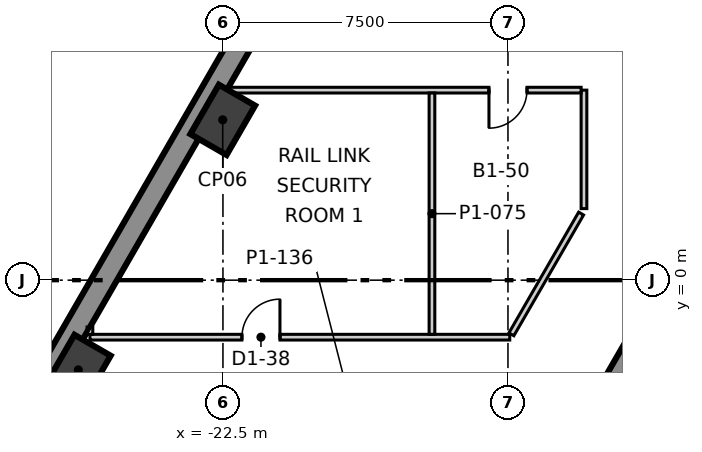
"""IFC4 building model, lengths in metres.
Left out: names, types, materials, properties, quantities, classifications, styles, units other than length and angle.
Written with IfcOpenShell. Run it as: python <this file> out.ifc"""

import sys

from ifc_helpers import new_model, si_unit, direction, frame, frame_2d, origin, origin_2d, place, context, subcontext, project, spatial, polyline, rectangle, outline, extrude, element, fill, save


model = new_model("IFC4")
c1 = context("Model", 3, precision=1e-05, world=origin(), true_north=direction((0.0, 1.0)))
c2 = subcontext(c1, "Body", "Model", "MODEL_VIEW")
j1 = project(units=[si_unit("LENGTHUNIT", "METRE"), si_unit("PLANEANGLEUNIT", "RADIAN")], contexts=[c1])
p1 = place(None, origin())
s1 = spatial("IfcSite", under=j1, at=p1, CompositionType="ELEMENT")
p2 = place(p1, origin())
s2 = spatial("IfcBuilding", under=s1, at=p2, CompositionType="ELEMENT")
p3 = place(p2, frame((0.0, 0.0, -5.5)))
s3 = spatial("IfcBuildingStorey", under=s2, at=p3, CompositionType="ELEMENT", Elevation=-5.5)
p4 = place(p3, frame((-3.507, 38.325, -0.4), z_axis=(0.0, 0.0, 1.0), x_axis=(-0.500003790369, -0.866023215403, 0.0)))
e1 = element("IfcWall", 1, at=p4, inside=s3, PredefinedType="SOLIDWALL", context=c2, shape_type="SweptSolid", body=[
    extrude(rectangle(XDim=62.874, YDim=0.6, at=frame_2d((31.437, 0.0))), origin(), (0.0, 0.0, 1.0), 5.5),
])
p5 = place(p3, frame((-1.617, 15.2, -0.4), z_axis=(0.0, 0.0, 1.0), x_axis=(-0.499992141631, -0.866029940768, 0.0)))
e2 = element("IfcWall", 2, at=p5, inside=s3, PredefinedType="SHEAR", context=c2, shape_type="SweptSolid", body=[
    extrude(outline(polyline([(-0.289, -0.499), (1.656, -0.499), (3.601, -0.499), (5.547, -0.499), (7.492, -0.499), (9.437, -0.5), (11.382, -0.5), (13.328, -0.5), (15.273, -0.5), (17.218, -0.5), (19.163, -0.5), (21.109, -0.5), (23.054, -0.5), (24.999, -0.5), (24.422, 0.5), (22.566, 0.5), (20.709, 0.5), (18.853, 0.5), (16.997, 0.5), (15.14, 0.5), (13.284, 0.5), (11.427, 0.5), (9.571, 0.5), (7.715, 0.5), (5.858, 0.5), (4.002, 0.5), (2.146, 0.5), (0.289, 0.5), (-0.289, -0.499)])), origin(), (0.0, 0.0, 1.0), 5.5),
])
p6 = place(p5, frame((11.805, 0.0, 0.4)))
e3 = element("IfcOpeningElement", 3, at=p6, cuts=e2, PredefinedType="OPENING", context=c2, shape_type="SweptSolid", body=[
    extrude(rectangle(XDim=1.1, YDim=2.1, at=frame_2d((0.55, 1.05))), frame((0.0, 0.51, 0.0), z_axis=(0.0, -1.0, 0.0), x_axis=(1.0, 0.0, 0.0)), (0.0, 0.0, 1.0), 1.02),
])
for number, where, z_axis, x_axis in (
    (4, (-22.506, 4.219, -0.4), (0.0, 0.0, 1.0), (0.5, 0.866, 0.0)),
    (5, (-26.306, -2.362, -0.4), (0.0, 0.0, 1.0), (0.5, 0.866, 0.0)),
):
    element("IfcColumn", number, at=place(p3, frame(where, z_axis=z_axis, x_axis=x_axis)), inside=s3, PredefinedType="COLUMN", context=c2, shape_type="SweptSolid", body=[
        extrude(rectangle(XDim=1.5, YDim=1.1, at=origin_2d()), origin(), (0.0, 0.0, 1.0), 5.5),
    ])
p7 = place(p3, frame((-13.0, 1.883, 0.0), z_axis=(0.0, 0.0, 1.0), x_axis=(0.0, 1.0, 0.0)))
e6 = element("IfcWall", 6, at=p7, inside=s3, PredefinedType="PARTITIONING", context=c2, shape_type="SweptSolid", body=[
    extrude(rectangle(XDim=3.117, YDim=0.15, at=frame_2d((1.559, 0.0))), origin(), (0.0, 0.0, 1.0), 5.1),
])
p8 = place(p3, frame((-26.0, -1.5, 0.0), z_axis=(0.0, 0.0, 1.0), x_axis=(1.0, 0.0, 0.0)))
e7 = element("IfcWall", 7, at=p8, inside=s3, PredefinedType="PARTITIONING", context=c2, shape_type="SweptSolid", body=[
    extrude(rectangle(XDim=11.047, YDim=0.15, at=frame_2d((5.523, 0.0))), origin(), (0.0, 0.0, 1.0), 4.5),
])
p9 = place(p8, frame((4.0, 0.0, 0.0)))
e8 = element("IfcOpeningElement", 8, at=p9, cuts=e7, PredefinedType="OPENING", context=c2, shape_type="SweptSolid", body=[
    extrude(rectangle(XDim=1.0, YDim=2.1, at=frame_2d((0.5, 1.05))), frame((0.0, 0.085, 0.0), z_axis=(0.0, -1.0, 0.0), x_axis=(1.0, 0.0, 0.0)), (0.0, 0.0, 1.0), 0.17),
])
p10 = place(p3, frame((-26.0, -1.425, 0.0), z_axis=(0.0, 0.0, 1.0), x_axis=(0.0, 1.0, 0.0)))
e9 = element("IfcWall", 9, at=p10, inside=s3, PredefinedType="PARTITIONING", context=c2, shape_type="SweptSolid", body=[
    extrude(rectangle(XDim=0.192, YDim=0.15, at=frame_2d((0.096, 0.0))), origin(), (0.0, 0.0, 1.0), 5.1),
])
p11 = place(p3, frame((-22.401, 5.0, 0.0), z_axis=(0.0, 0.0, 1.0), x_axis=(1.0, 0.0, 0.0)))
e10 = element("IfcWall", 10, at=p11, inside=s3, PredefinedType="PARTITIONING", context=c2, shape_type="SweptSolid", body=[
    extrude(rectangle(XDim=9.326, YDim=0.15, at=frame_2d((4.663, 0.0))), origin(), (0.0, 0.0, 1.0), 5.1),
])
p12 = place(p11, frame((6.901, 0.0, 0.0)))
e11 = element("IfcOpeningElement", 11, at=p12, cuts=e10, PredefinedType="OPENING", context=c2, shape_type="SweptSolid", body=[
    extrude(rectangle(XDim=1.0, YDim=2.1, at=frame_2d((0.5, 1.05))), frame((0.0, 0.085, 0.0), z_axis=(0.0, -1.0, 0.0), x_axis=(1.0, 0.0, 0.0)), (0.0, 0.0, 1.0), 0.17),
])
p13 = place(p3, frame((-14.91, -1.425, 0.0), z_axis=(0.0, 0.0, 1.0), x_axis=(0.500031511731, 0.866007209713, 0.0)))
e12 = element("IfcWall", 12, at=p13, inside=s3, PredefinedType="PARTITIONING", context=c2, shape_type="SweptSolid", body=[
    extrude(rectangle(XDim=3.67, YDim=0.15, at=frame_2d((1.835, 0.0))), origin(), (0.0, 0.0, 1.0), 5.1),
])
p14 = place(p3, frame((-17.0, -1.425, 0.0), z_axis=(0.0, 0.0, 1.0), x_axis=(0.0, 1.0, 0.0)))
e13 = element("IfcWall", 13, at=p14, inside=s3, PredefinedType="PARTITIONING", context=c2, shape_type="SweptSolid", body=[
    extrude(rectangle(XDim=6.35, YDim=0.15, at=frame_2d((3.175, 0.0))), origin(), (0.0, 0.0, 1.0), 5.1),
])
p15 = place(p3, frame((-13.946, -6.204, 0.0), z_axis=(0.0, 0.0, 1.0), x_axis=(0.866036527536, 0.499980732602, 0.0)))
e14 = element("IfcWall", 14, at=p15, inside=s3, PredefinedType="SOLIDWALL", context=c2, shape_type="SweptSolid", body=[
    extrude(rectangle(XDim=8.564, YDim=0.2, at=frame_2d((4.282, 0.0))), origin(), (0.0, 0.0, 1.0), 5.1),
])
p16 = place(p9, origin())
e15 = element("IfcDoor", 15, at=p16, inside=s3, OperationType="SINGLE_SWING_LEFT", PredefinedType="DOOR", context=c2, shape_type="SweptSolid", body=[
    extrude(rectangle(XDim=1.0, YDim=2.1, at=frame_2d((0.5, 1.05))), frame((0.0, 0.025, 0.0), z_axis=(0.0, -1.0, 0.0), x_axis=(1.0, 0.0, 0.0)), (0.0, 0.0, 1.0), 0.05),
])
fill(e8, e15)
p17 = place(p12, origin())
e16 = element("IfcDoor", 16, at=p17, inside=s3, OperationType="SINGLE_SWING_LEFT", PredefinedType="DOOR", context=c2, shape_type="SweptSolid", body=[
    extrude(rectangle(XDim=1.0, YDim=2.1, at=frame_2d((0.5, 1.05))), frame((0.0, 0.025, 0.0), z_axis=(0.0, -1.0, 0.0), x_axis=(1.0, 0.0, 0.0)), (0.0, 0.0, 1.0), 0.05),
])
fill(e11, e16)
save(model, sys.argv[1])
